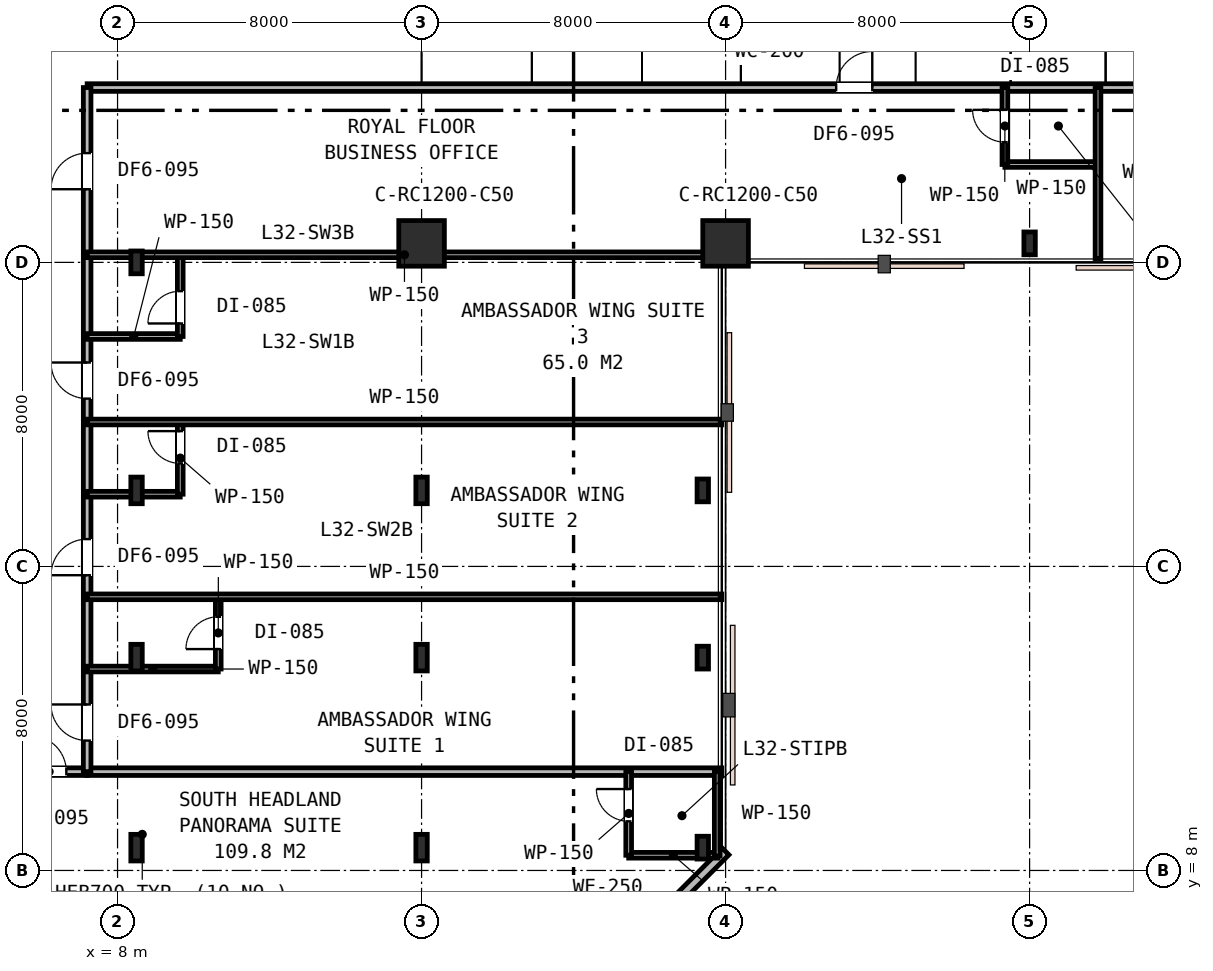
"""IFC4 building model, lengths in metres.
Left out: names, types, materials, properties, quantities, classifications, styles, units other than length and angle.
Written with IfcOpenShell. Run it as: python <this file> out.ifc"""

import sys

from ifc_helpers import new_model, si_unit, direction, frame, frame_2d, origin, origin_2d, place, context, subcontext, project, spatial, rectangle, i_section, extrude, element, fill, save


model = new_model("IFC4")
c1 = context("Model", 3, precision=1e-05, world=origin(), true_north=direction((0.0, 1.0)))
c2 = subcontext(c1, "Body", "Model", "MODEL_VIEW")
j1 = project(units=[si_unit("LENGTHUNIT", "METRE"), si_unit("PLANEANGLEUNIT", "RADIAN")], contexts=[c1])
p1 = place(None, origin())
s1 = spatial("IfcSite", under=j1, at=p1, CompositionType="ELEMENT")
p2 = place(p1, origin())
s2 = spatial("IfcBuilding", under=s1, at=p2, CompositionType="ELEMENT")
p3 = place(p2, frame((0.0, 0.0, 126.0)))
s3 = spatial("IfcBuildingStorey", under=s2, at=p3, CompositionType="ELEMENT", Elevation=126.0)
p4 = place(p3, frame((8.5, 24.0, 0.0), z_axis=(0.0, 0.0, 1.0), x_axis=(1.0, 0.0, 0.0)))
e1 = element("IfcColumn", 1, at=p4, inside=s3, PredefinedType="COLUMN", context=c2, shape_type="SweptSolid", body=[
    extrude(i_section(OverallWidth=0.3, OverallDepth=0.6, WebThickness=0.015, FlangeThickness=0.03, FilletRadius=0.027, at=origin_2d()), origin(), (0.0, 0.0, 1.0), 3.6),
])
for number, where, z_axis, x_axis in (
    (2, (16.0, 24.5, 0.0), (0.0, 0.0, 1.0), (1.0, 0.0, 0.0)),
    (3, (24.0, 24.5, 0.0), (0.0, 0.0, 1.0), (1.0, 0.0, 0.0)),
):
    element("IfcColumn", number, at=place(p3, frame(where, z_axis=z_axis, x_axis=x_axis)), inside=s3, PredefinedType="COLUMN", context=c2, shape_type="SweptSolid", body=[
        extrude(rectangle(XDim=1.2, YDim=1.2, at=origin_2d()), origin(), (0.0, 0.0, 1.0), 3.6),
    ])
for number, where, z_axis, x_axis in (
    (4, (32.0, 24.5, 0.0), (0.0, 0.0, 1.0), (1.0, 0.0, 0.0)),
    (5, (23.4, 8.6, 0.0), (0.0, 0.0, 1.0), (1.0, 0.0, 0.0)),
    (6, (23.4, 13.6, 0.0), (0.0, 0.0, 1.0), (1.0, 0.0, 0.0)),
    (7, (23.4, 18.0, 0.0), (0.0, 0.0, 1.0), (1.0, 0.0, 0.0)),
):
    element("IfcColumn", number, at=place(p3, frame(where, z_axis=z_axis, x_axis=x_axis)), inside=s3, PredefinedType="COLUMN", context=c2, shape_type="SweptSolid", body=[
        extrude(i_section(OverallWidth=0.3, OverallDepth=0.6, WebThickness=0.015, FlangeThickness=0.03, FilletRadius=0.027, at=origin_2d()), origin(), (0.0, 0.0, 1.0), 3.6),
    ])
for number, where, z_axis, x_axis in (
    (8, (8.5, 8.6, 0.0), (0.0, 0.0, 1.0), (1.0, 0.0, 0.0)),
    (9, (16.0, 8.6, 0.0), (0.0, 0.0, 1.0), (1.0, 0.0, 0.0)),
    (10, (8.5, 13.6, 0.0), (0.0, 0.0, 1.0), (1.0, 0.0, 0.0)),
    (11, (16.0, 13.6, 0.0), (0.0, 0.0, 1.0), (1.0, 0.0, 0.0)),
    (12, (8.5, 18.0, 0.0), (0.0, 0.0, 1.0), (1.0, 0.0, 0.0)),
    (13, (16.0, 18.0, 0.0), (0.0, 0.0, 1.0), (1.0, 0.0, 0.0)),
):
    element("IfcColumn", number, at=place(p3, frame(where, z_axis=z_axis, x_axis=x_axis)), inside=s3, PredefinedType="COLUMN", context=c2, shape_type="SweptSolid", body=[
        extrude(i_section(OverallWidth=0.3, OverallDepth=0.7, WebThickness=0.017, FlangeThickness=0.032, FilletRadius=0.027, at=origin_2d()), origin(), (0.0, 0.0, 1.0), 3.6),
    ])
p5 = place(p3, frame((20.5, 5.0, 0.0), z_axis=(0.0, 0.0, 1.0), x_axis=(0.707106781187, 0.707106781187, 0.0)))
e14 = element("IfcWall", 14, at=p5, inside=s3, PredefinedType="STANDARD", context=c2, shape_type="SweptSolid", body=[
    extrude(rectangle(XDim=4.95, YDim=0.25, at=frame_2d((2.475, 0.0))), origin(), (0.0, 0.0, 1.0), 3.33),
])
p6 = place(p5, frame((1.765, 0.0, 0.85)))
e15 = element("IfcOpeningElement", 15, at=p6, cuts=e14, PredefinedType="OPENING", context=c2, shape_type="SweptSolid", body=[
    extrude(rectangle(XDim=1.2, YDim=1.6, at=frame_2d((0.6, 0.8))), frame((0.0, 0.135, 0.0), z_axis=(0.0, -1.0, 0.0), x_axis=(1.0, 0.0, 0.0)), (0.0, 0.0, 1.0), 0.27),
])
p7 = place(p3, frame((7.2, 28.6, 0.0), z_axis=(0.0, 0.0, 1.0), x_axis=(1.0, 0.0, 0.0)))
e16 = element("IfcWall", 16, at=p7, inside=s3, PredefinedType="PARTITIONING", context=c2, shape_type="SweptSolid", body=[
    extrude(rectangle(XDim=37.0, YDim=0.2, at=frame_2d((18.5, 0.0))), origin(), (0.0, 0.0, 1.0), 2.87),
])
p8 = place(p7, frame((19.71, 0.0, 0.0)))
e17 = element("IfcOpeningElement", 17, at=p8, cuts=e16, PredefinedType="OPENING", context=c2, shape_type="SweptSolid", body=[
    extrude(rectangle(XDim=0.95, YDim=2.15, at=frame_2d((0.475, 1.075))), frame((0.0, 0.11, 0.0), z_axis=(0.0, -1.0, 0.0), x_axis=(1.0, 0.0, 0.0)), (0.0, 0.0, 1.0), 0.22),
])
p9 = place(p7, frame((29.78, 0.0, 0.0)))
e18 = element("IfcOpeningElement", 18, at=p9, cuts=e16, PredefinedType="OPENING", context=c2, shape_type="SweptSolid", body=[
    extrude(rectangle(XDim=0.95, YDim=2.15, at=frame_2d((0.475, 1.075))), frame((0.0, 0.11, 0.0), z_axis=(0.0, -1.0, 0.0), x_axis=(1.0, 0.0, 0.0)), (0.0, 0.0, 1.0), 0.22),
])
p10 = place(p3, frame((7.2, 10.6, 0.0), z_axis=(0.0, 0.0, 1.0), x_axis=(1.0, 0.0, 0.0)))
e19 = element("IfcWall", 19, at=p10, inside=s3, PredefinedType="PARTITIONING", context=c2, shape_type="SweptSolid", body=[
    extrude(rectangle(XDim=16.7, YDim=0.2, at=frame_2d((8.35, 0.0))), origin(), (0.0, 0.0, 1.0), 2.87),
])
p11 = place(p3, frame((5.2, 10.6, 0.0), z_axis=(0.0, 0.0, 1.0), x_axis=(1.0, 0.0, 0.0)))
e20 = element("IfcWall", 20, at=p11, inside=s3, PredefinedType="PARTITIONING", context=c2, shape_type="SweptSolid", body=[
    extrude(rectangle(XDim=2.0, YDim=0.2, at=frame_2d((1.0, 0.0))), origin(), (0.0, 0.0, 1.0), 3.01),
])
p12 = place(p11, frame((0.502, 0.0, 0.0)))
e21 = element("IfcOpeningElement", 21, at=p12, cuts=e20, PredefinedType="OPENING", context=c2, shape_type="SweptSolid", body=[
    extrude(rectangle(XDim=0.95, YDim=2.15, at=frame_2d((0.475, 1.075))), frame((0.0, 0.11, 0.0), z_axis=(0.0, -1.0, 0.0), x_axis=(1.0, 0.0, 0.0)), (0.0, 0.0, 1.0), 0.22),
])
p13 = place(p3, frame((21.45, 8.4, 0.0), z_axis=(0.0, 0.0, 1.0), x_axis=(1.0, 0.0, 0.0)))
e22 = element("IfcWall", 22, at=p13, inside=s3, PredefinedType="PARTITIONING", context=c2, shape_type="SweptSolid", body=[
    extrude(rectangle(XDim=2.35, YDim=0.15, at=frame_2d((1.175, 0.0))), origin(), (0.0, 0.0, 1.0), 2.87),
])
p14 = place(p3, frame((21.45, 8.4, 0.0), z_axis=(0.0, 0.0, 1.0), x_axis=(0.0, 1.0, 0.0)))
e23 = element("IfcWall", 23, at=p14, inside=s3, PredefinedType="PARTITIONING", context=c2, shape_type="SweptSolid", body=[
    extrude(rectangle(XDim=2.2, YDim=0.15, at=frame_2d((1.1, 0.0))), origin(), (0.0, 0.0, 1.0), 2.87),
])
p15 = place(p14, frame((0.892, 0.0, 0.0)))
e24 = element("IfcOpeningElement", 24, at=p15, cuts=e23, PredefinedType="OPENING", context=c2, shape_type="SweptSolid", body=[
    extrude(rectangle(XDim=0.85, YDim=2.15, at=frame_2d((0.425, 1.075))), frame((0.0, 0.085, 0.0), z_axis=(0.0, -1.0, 0.0), x_axis=(1.0, 0.0, 0.0)), (0.0, 0.0, 1.0), 0.17),
])
p16 = place(p3, frame((23.78, 10.6, 0.0), z_axis=(0.0, 0.0, 1.0), x_axis=(0.0, -1.0, 0.0)))
e25 = element("IfcWall", 25, at=p16, inside=s3, PredefinedType="PARTITIONING", context=c2, shape_type="SweptSolid", body=[
    extrude(rectangle(XDim=2.22, YDim=0.15, at=frame_2d((1.11, 0.0))), origin(), (0.0, 0.0, 1.0), 2.87),
])
p17 = place(p3, frame((7.2, 10.6, 0.0), z_axis=(0.0, 0.0, 1.0), x_axis=(0.0, 1.0, 0.0)))
e26 = element("IfcWall", 26, at=p17, inside=s3, PredefinedType="PARTITIONING", context=c2, shape_type="SweptSolid", body=[
    extrude(rectangle(XDim=18.0, YDim=0.2, at=frame_2d((9.0, 0.0))), origin(), (0.0, 0.0, 1.0), 2.87),
])
p18 = place(p17, frame((0.818, 0.0, 0.0)))
e27 = element("IfcOpeningElement", 27, at=p18, cuts=e26, PredefinedType="OPENING", context=c2, shape_type="SweptSolid", body=[
    extrude(rectangle(XDim=0.95, YDim=2.15, at=frame_2d((0.475, 1.075))), frame((0.0, 0.11, 0.0), z_axis=(0.0, -1.0, 0.0), x_axis=(1.0, 0.0, 0.0)), (0.0, 0.0, 1.0), 0.22),
])
p19 = place(p17, frame((5.169, 0.0, 0.0)))
e28 = element("IfcOpeningElement", 28, at=p19, cuts=e26, PredefinedType="OPENING", context=c2, shape_type="SweptSolid", body=[
    extrude(rectangle(XDim=0.95, YDim=2.15, at=frame_2d((0.475, 1.075))), frame((0.0, 0.11, 0.0), z_axis=(0.0, -1.0, 0.0), x_axis=(1.0, 0.0, 0.0)), (0.0, 0.0, 1.0), 0.22),
])
p20 = place(p17, frame((9.815, 0.0, 0.0)))
e29 = element("IfcOpeningElement", 29, at=p20, cuts=e26, PredefinedType="OPENING", context=c2, shape_type="SweptSolid", body=[
    extrude(rectangle(XDim=0.95, YDim=2.15, at=frame_2d((0.475, 1.075))), frame((0.0, 0.11, 0.0), z_axis=(0.0, -1.0, 0.0), x_axis=(1.0, 0.0, 0.0)), (0.0, 0.0, 1.0), 0.22),
])
p21 = place(p17, frame((15.325, 0.0, 0.0)))
e30 = element("IfcOpeningElement", 30, at=p21, cuts=e26, PredefinedType="OPENING", context=c2, shape_type="SweptSolid", body=[
    extrude(rectangle(XDim=0.95, YDim=2.15, at=frame_2d((0.475, 1.075))), frame((0.0, 0.11, 0.0), z_axis=(0.0, -1.0, 0.0), x_axis=(1.0, 0.0, 0.0)), (0.0, 0.0, 1.0), 0.22),
])
p22 = place(p3, frame((7.2, 13.3, 0.0), z_axis=(0.0, 0.0, 1.0), x_axis=(1.0, 0.0, 0.0)))
e31 = element("IfcWall", 31, at=p22, inside=s3, PredefinedType="PARTITIONING", context=c2, shape_type="SweptSolid", body=[
    extrude(rectangle(XDim=3.45, YDim=0.15, at=frame_2d((1.725, 0.0))), origin(), (0.0, 0.0, 1.0), 2.87),
])
p23 = place(p3, frame((10.65, 13.3, 0.0), z_axis=(0.0, 0.0, 1.0), x_axis=(0.0, 1.0, 0.0)))
e32 = element("IfcWall", 32, at=p23, inside=s3, PredefinedType="PARTITIONING", context=c2, shape_type="SweptSolid", body=[
    extrude(rectangle(XDim=1.9, YDim=0.15, at=frame_2d((0.95, 0.0))), origin(), (0.0, 0.0, 1.0), 2.87),
])
p24 = place(p23, frame((0.525, 0.0, 0.0)))
e33 = element("IfcOpeningElement", 33, at=p24, cuts=e32, PredefinedType="OPENING", context=c2, shape_type="SweptSolid", body=[
    extrude(rectangle(XDim=0.85, YDim=2.15, at=frame_2d((0.425, 1.075))), frame((0.0, 0.085, 0.0), z_axis=(0.0, -1.0, 0.0), x_axis=(1.0, 0.0, 0.0)), (0.0, 0.0, 1.0), 0.17),
])
p25 = place(p3, frame((7.2, 15.2, 0.0), z_axis=(0.0, 0.0, 1.0), x_axis=(1.0, 0.0, 0.0)))
e34 = element("IfcWall", 34, at=p25, inside=s3, PredefinedType="PARTITIONING", context=c2, shape_type="SweptSolid", body=[
    extrude(rectangle(XDim=16.7, YDim=0.15, at=frame_2d((8.35, 0.0))), origin(), (0.0, 0.0, 1.0), 2.87),
])
p26 = place(p3, frame((7.2, 17.9, 0.0), z_axis=(0.0, 0.0, 1.0), x_axis=(1.0, 0.0, 0.0)))
e35 = element("IfcWall", 35, at=p26, inside=s3, PredefinedType="PARTITIONING", context=c2, shape_type="SweptSolid", body=[
    extrude(rectangle(XDim=2.45, YDim=0.15, at=frame_2d((1.225, 0.0))), origin(), (0.0, 0.0, 1.0), 2.87),
])
p27 = place(p3, frame((9.65, 17.9, 0.0), z_axis=(0.0, 0.0, 1.0), x_axis=(0.0, 1.0, 0.0)))
e36 = element("IfcWall", 36, at=p27, inside=s3, PredefinedType="PARTITIONING", context=c2, shape_type="SweptSolid", body=[
    extrude(rectangle(XDim=1.9, YDim=0.15, at=frame_2d((0.95, 0.0))), origin(), (0.0, 0.0, 1.0), 2.87),
])
p28 = place(p27, frame((0.81, 0.0, 0.0)))
e37 = element("IfcOpeningElement", 37, at=p28, cuts=e36, PredefinedType="OPENING", context=c2, shape_type="SweptSolid", body=[
    extrude(rectangle(XDim=0.85, YDim=2.15, at=frame_2d((0.425, 1.075))), frame((0.0, 0.085, 0.0), z_axis=(0.0, -1.0, 0.0), x_axis=(1.0, 0.0, 0.0)), (0.0, 0.0, 1.0), 0.17),
])
p29 = place(p3, frame((7.2, 19.8, 0.0), z_axis=(0.0, 0.0, 1.0), x_axis=(1.0, 0.0, 0.0)))
e38 = element("IfcWall", 38, at=p29, inside=s3, PredefinedType="PARTITIONING", context=c2, shape_type="SweptSolid", body=[
    extrude(rectangle(XDim=16.7, YDim=0.15, at=frame_2d((8.35, 0.0))), origin(), (0.0, 0.0, 1.0), 2.87),
])
p30 = place(p3, frame((7.2, 22.05, 0.0), z_axis=(0.0, 0.0, 1.0), x_axis=(1.0, 0.0, 0.0)))
e39 = element("IfcWall", 39, at=p30, inside=s3, PredefinedType="PARTITIONING", context=c2, shape_type="SweptSolid", body=[
    extrude(rectangle(XDim=2.45, YDim=0.15, at=frame_2d((1.225, 0.0))), origin(), (0.0, 0.0, 1.0), 2.87),
])
p31 = place(p3, frame((9.65, 22.05, 0.0), z_axis=(0.0, 0.0, 1.0), x_axis=(0.0, 1.0, 0.0)))
e40 = element("IfcWall", 40, at=p31, inside=s3, PredefinedType="PARTITIONING", context=c2, shape_type="SweptSolid", body=[
    extrude(rectangle(XDim=2.15, YDim=0.15, at=frame_2d((1.075, 0.0))), origin(), (0.0, 0.0, 1.0), 2.87),
])
p32 = place(p31, frame((0.343, 0.0, 0.0)))
e41 = element("IfcOpeningElement", 41, at=p32, cuts=e40, PredefinedType="OPENING", context=c2, shape_type="SweptSolid", body=[
    extrude(rectangle(XDim=0.85, YDim=2.15, at=frame_2d((0.425, 1.075))), frame((0.0, 0.085, 0.0), z_axis=(0.0, -1.0, 0.0), x_axis=(1.0, 0.0, 0.0)), (0.0, 0.0, 1.0), 0.17),
])
p33 = place(p3, frame((7.2, 24.2, 0.0), z_axis=(0.0, 0.0, 1.0), x_axis=(1.0, 0.0, 0.0)))
e42 = element("IfcWall", 42, at=p33, inside=s3, PredefinedType="PARTITIONING", context=c2, shape_type="SweptSolid", body=[
    extrude(rectangle(XDim=16.7, YDim=0.15, at=frame_2d((8.35, 0.0))), origin(), (0.0, 0.0, 1.0), 2.87),
])
p34 = place(p3, frame((31.35, 26.576, 0.0), z_axis=(0.0, 0.0, 1.0), x_axis=(1.0, 0.0, 0.0)))
e43 = element("IfcWall", 43, at=p34, inside=s3, PredefinedType="PARTITIONING", context=c2, shape_type="SweptSolid", body=[
    extrude(rectangle(XDim=2.45, YDim=0.15, at=frame_2d((1.225, 0.0))), origin(), (0.0, 0.0, 1.0), 3.33),
])
p35 = place(p3, frame((31.35, 26.576, 0.0), z_axis=(0.0, 0.0, 1.0), x_axis=(0.0, 1.0, 0.0)))
e44 = element("IfcWall", 44, at=p35, inside=s3, PredefinedType="PARTITIONING", context=c2, shape_type="SweptSolid", body=[
    extrude(rectangle(XDim=2.024, YDim=0.15, at=frame_2d((1.012, 0.0))), origin(), (0.0, 0.0, 1.0), 3.33),
])
p36 = place(p35, frame((0.587, 0.0, 0.0)))
e45 = element("IfcOpeningElement", 45, at=p36, cuts=e44, PredefinedType="OPENING", context=c2, shape_type="SweptSolid", body=[
    extrude(rectangle(XDim=0.85, YDim=2.15, at=frame_2d((0.425, 1.075))), frame((0.0, 0.085, 0.0), z_axis=(0.0, -1.0, 0.0), x_axis=(1.0, 0.0, 0.0)), (0.0, 0.0, 1.0), 0.17),
])
p37 = place(p3, frame((33.8, 28.6, 0.0), z_axis=(0.0, 0.0, 1.0), x_axis=(0.0, -1.0, 0.0)))
e46 = element("IfcWall", 46, at=p37, inside=s3, PredefinedType="PARTITIONING", context=c2, shape_type="SweptSolid", body=[
    extrude(rectangle(XDim=4.5, YDim=0.15, at=frame_2d((2.25, 0.0))), origin(), (0.0, 0.0, 1.0), 2.96),
])
p38 = place(p12, origin())
e47 = element("IfcDoor", 47, at=p38, inside=s3, OperationType="SINGLE_SWING_LEFT", PredefinedType="DOOR", context=c2, shape_type="SweptSolid", body=[
    extrude(rectangle(XDim=0.95, YDim=2.15, at=frame_2d((0.475, 1.075))), frame((0.0, 0.025, 0.0), z_axis=(0.0, -1.0, 0.0), x_axis=(1.0, 0.0, 0.0)), (0.0, 0.0, 1.0), 0.05),
])
fill(e21, e47)
p39 = place(p15, origin())
e48 = element("IfcDoor", 48, at=p39, inside=s3, OperationType="SINGLE_SWING_RIGHT", PredefinedType="DOOR", context=c2, shape_type="SweptSolid", body=[
    extrude(rectangle(XDim=0.85, YDim=2.15, at=frame_2d((0.425, 1.075))), frame((0.0, 0.025, 0.0), z_axis=(0.0, -1.0, 0.0), x_axis=(1.0, 0.0, 0.0)), (0.0, 0.0, 1.0), 0.05),
])
fill(e24, e48)
p40 = place(p18, origin())
e49 = element("IfcDoor", 49, at=p40, inside=s3, OperationType="SINGLE_SWING_RIGHT", PredefinedType="DOOR", context=c2, shape_type="SweptSolid", body=[
    extrude(rectangle(XDim=0.95, YDim=2.15, at=frame_2d((0.475, 1.075))), frame((0.0, 0.025, 0.0), z_axis=(0.0, -1.0, 0.0), x_axis=(1.0, 0.0, 0.0)), (0.0, 0.0, 1.0), 0.05),
])
fill(e27, e49)
p41 = place(p24, origin())
e50 = element("IfcDoor", 50, at=p41, inside=s3, OperationType="SINGLE_SWING_LEFT", PredefinedType="DOOR", context=c2, shape_type="SweptSolid", body=[
    extrude(rectangle(XDim=0.85, YDim=2.15, at=frame_2d((0.425, 1.075))), frame((0.0, 0.025, 0.0), z_axis=(0.0, -1.0, 0.0), x_axis=(1.0, 0.0, 0.0)), (0.0, 0.0, 1.0), 0.05),
])
fill(e33, e50)
p42 = place(p19, origin())
e51 = element("IfcDoor", 51, at=p42, inside=s3, OperationType="SINGLE_SWING_LEFT", PredefinedType="DOOR", context=c2, shape_type="SweptSolid", body=[
    extrude(rectangle(XDim=0.95, YDim=2.15, at=frame_2d((0.475, 1.075))), frame((0.0, 0.025, 0.0), z_axis=(0.0, -1.0, 0.0), x_axis=(1.0, 0.0, 0.0)), (0.0, 0.0, 1.0), 0.05),
])
fill(e28, e51)
p43 = place(p28, origin())
e52 = element("IfcDoor", 52, at=p43, inside=s3, OperationType="SINGLE_SWING_RIGHT", PredefinedType="DOOR", context=c2, shape_type="SweptSolid", body=[
    extrude(rectangle(XDim=0.85, YDim=2.15, at=frame_2d((0.425, 1.075))), frame((0.0, 0.025, 0.0), z_axis=(0.0, -1.0, 0.0), x_axis=(1.0, 0.0, 0.0)), (0.0, 0.0, 1.0), 0.05),
])
fill(e37, e52)
p44 = place(p20, origin())
e53 = element("IfcDoor", 53, at=p44, inside=s3, OperationType="SINGLE_SWING_RIGHT", PredefinedType="DOOR", context=c2, shape_type="SweptSolid", body=[
    extrude(rectangle(XDim=0.95, YDim=2.15, at=frame_2d((0.475, 1.075))), frame((0.0, 0.025, 0.0), z_axis=(0.0, -1.0, 0.0), x_axis=(1.0, 0.0, 0.0)), (0.0, 0.0, 1.0), 0.05),
])
fill(e29, e53)
p45 = place(p32, origin())
e54 = element("IfcDoor", 54, at=p45, inside=s3, OperationType="SINGLE_SWING_LEFT", PredefinedType="DOOR", context=c2, shape_type="SweptSolid", body=[
    extrude(rectangle(XDim=0.85, YDim=2.15, at=frame_2d((0.425, 1.075))), frame((0.0, 0.025, 0.0), z_axis=(0.0, -1.0, 0.0), x_axis=(1.0, 0.0, 0.0)), (0.0, 0.0, 1.0), 0.05),
])
fill(e41, e54)
p46 = place(p21, origin())
e55 = element("IfcDoor", 55, at=p46, inside=s3, OperationType="SINGLE_SWING_LEFT", PredefinedType="DOOR", context=c2, shape_type="SweptSolid", body=[
    extrude(rectangle(XDim=0.95, YDim=2.15, at=frame_2d((0.475, 1.075))), frame((0.0, 0.025, 0.0), z_axis=(0.0, -1.0, 0.0), x_axis=(1.0, 0.0, 0.0)), (0.0, 0.0, 1.0), 0.05),
])
fill(e30, e55)
p47 = place(p8, origin())
e56 = element("IfcDoor", 56, at=p47, inside=s3, OperationType="SINGLE_SWING_RIGHT", PredefinedType="DOOR", context=c2, shape_type="SweptSolid", body=[
    extrude(rectangle(XDim=0.95, YDim=2.15, at=frame_2d((0.475, 1.075))), frame((0.0, 0.025, 0.0), z_axis=(0.0, -1.0, 0.0), x_axis=(1.0, 0.0, 0.0)), (0.0, 0.0, 1.0), 0.05),
])
fill(e17, e56)
p48 = place(p36, origin())
e57 = element("IfcDoor", 57, at=p48, inside=s3, OperationType="SINGLE_SWING_RIGHT", PredefinedType="DOOR", context=c2, shape_type="SweptSolid", body=[
    extrude(rectangle(XDim=0.85, YDim=2.15, at=frame_2d((0.425, 1.075))), frame((0.0, 0.025, 0.0), z_axis=(0.0, -1.0, 0.0), x_axis=(1.0, 0.0, 0.0)), (0.0, 0.0, 1.0), 0.05),
])
fill(e45, e57)
save(model, sys.argv[1])
